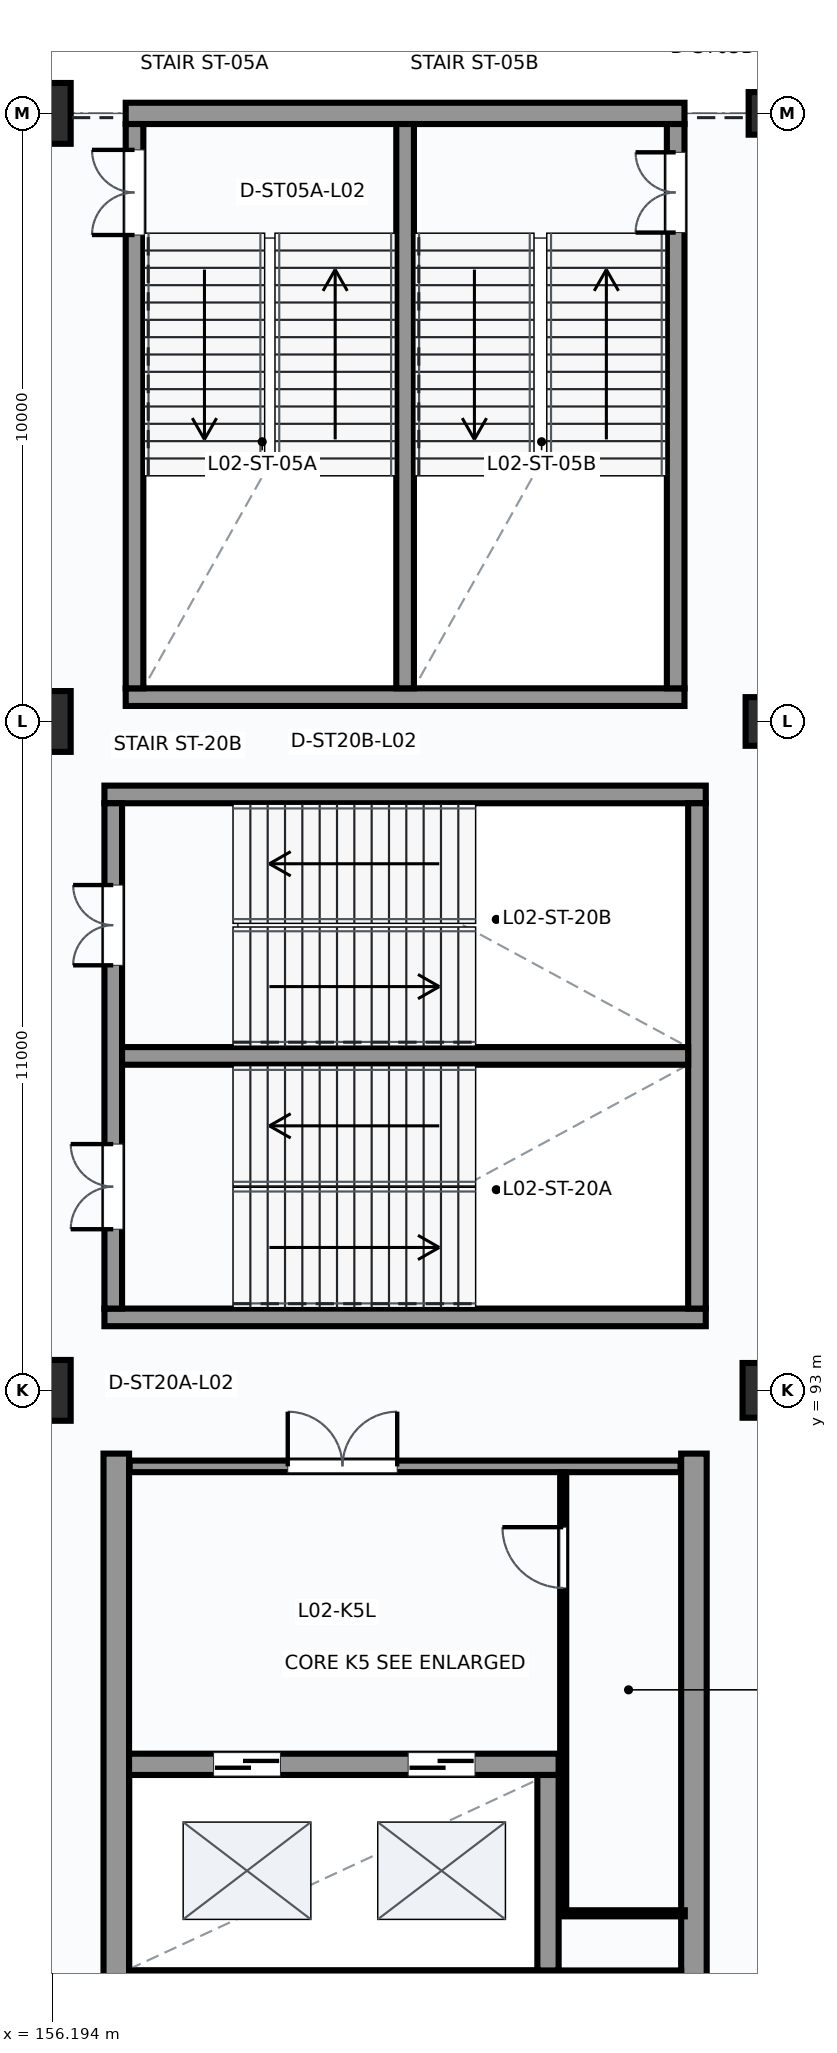
"""IFC4 building model, lengths in metres.
Left out: names, types, materials, properties, quantities, classifications, styles, units other than length and angle.
Written with IfcOpenShell. Run it as: python <this file> out.ifc"""

import sys

from ifc_helpers import new_model, si_unit, direction, frame, frame_2d, origin, origin_2d, place, context, subcontext, project, spatial, rectangle, circle, extrude, element, fill, save


model = new_model("IFC4")
c1 = context("Model", 3, precision=1e-05, world=origin(), true_north=direction((0.0, 1.0)))
c2 = subcontext(c1, "Body", "Model", "MODEL_VIEW")
j1 = project(units=[si_unit("LENGTHUNIT", "METRE"), si_unit("PLANEANGLEUNIT", "RADIAN")], contexts=[c1])
p1 = place(None, origin())
s1 = spatial("IfcSite", under=j1, at=p1, CompositionType="ELEMENT")
p2 = place(p1, origin())
s2 = spatial("IfcBuilding", under=s1, at=p2, CompositionType="ELEMENT")
p3 = place(p2, frame((0.0, 0.0, 10.2)))
s3 = spatial("IfcBuildingStorey", under=s2, at=p3, CompositionType="ELEMENT", Elevation=10.2)
for number, where, z_axis, x_axis in (
    (1, (156.0, 93.0, 0.0), (0.0, 0.0, 1.0), (1.0, 0.0, 0.0)),
    (2, (156.0, 104.0, 0.0), (0.0, 0.0, 1.0), (1.0, 0.0, 0.0)),
    (3, (156.0, 114.0, 0.0), (0.0, 0.0, 1.0), (1.0, 0.0, 0.0)),
):
    element("IfcColumn", number, at=place(p3, frame(where, z_axis=z_axis, x_axis=x_axis)), inside=s3, PredefinedType="COLUMN", context=c2, shape_type="SweptSolid", body=[
        extrude(rectangle(XDim=1.0, YDim=1.0, at=origin_2d()), origin(), (0.0, 0.0, 1.0), 4.5),
    ])
p4 = place(p3, frame((168.0, 93.0, 0.0), z_axis=(0.0, 0.0, 1.0), x_axis=(1.0, 0.0, 0.0)))
e4 = element("IfcColumn", 4, at=p4, inside=s3, PredefinedType="COLUMN", context=c2, shape_type="SweptSolid", body=[
    extrude(circle(Radius=0.45, at=origin_2d()), origin(), (0.0, 0.0, 1.0), 4.5),
])
p5 = place(p3, frame((168.0, 104.0, 0.0), z_axis=(0.0, 0.0, 1.0), x_axis=(1.0, 0.0, 0.0)))
e5 = element("IfcColumn", 5, at=p5, inside=s3, PredefinedType="COLUMN", context=c2, shape_type="SweptSolid", body=[
    extrude(circle(Radius=0.4, at=origin_2d()), origin(), (0.0, 0.0, 1.0), 4.5),
])
p6 = place(p3, frame((168.0, 114.0, 0.0), z_axis=(0.0, 0.0, 1.0), x_axis=(1.0, 0.0, 0.0)))
e6 = element("IfcColumn", 6, at=p6, inside=s3, PredefinedType="COLUMN", context=c2, shape_type="SweptSolid", body=[
    extrude(circle(Radius=0.35, at=origin_2d()), origin(), (0.0, 0.0, 1.0), 4.5),
])
p7 = place(p3, frame((157.405, 104.4, 0.0), z_axis=(0.0, 0.0, 1.0), x_axis=(1.0, 0.0, 0.0)))
e7 = element("IfcWall", 7, at=p7, inside=s3, PredefinedType="SHEAR", context=c2, shape_type="SweptSolid", body=[
    extrude(rectangle(XDim=9.19, YDim=0.29, at=frame_2d((4.595, 0.0))), origin(), (0.0, 0.0, 1.0), 4.5),
])
p8 = place(p3, frame((157.405, 114.0, 0.0), z_axis=(0.0, 0.0, 1.0), x_axis=(1.0, 0.0, 0.0)))
e8 = element("IfcWall", 8, at=p8, inside=s3, PredefinedType="SHEAR", context=c2, shape_type="SweptSolid", body=[
    extrude(rectangle(XDim=9.19, YDim=0.35, at=frame_2d((4.595, 0.0))), origin(), (0.0, 0.0, 1.0), 3.437),
])
p9 = place(p3, frame((157.55, 104.545, 0.0), z_axis=(0.0, 0.0, 1.0), x_axis=(0.0, 1.0, 0.0)))
e9 = element("IfcWall", 9, at=p9, inside=s3, PredefinedType="SHEAR", context=c2, shape_type="SweptSolid", body=[
    extrude(rectangle(XDim=9.28, YDim=0.29, at=frame_2d((4.64, 0.0))), origin(), (0.0, 0.0, 1.0), 4.5),
])
p10 = place(p9, frame((7.455, 0.0, 0.0)))
e10 = element("IfcOpeningElement", 10, at=p10, cuts=e9, PredefinedType="OPENING", context=c2, shape_type="SweptSolid", body=[
    extrude(rectangle(XDim=1.4, YDim=2.2, at=frame_2d((0.7, 1.1))), frame((0.0, 0.155, 0.0), z_axis=(0.0, -1.0, 0.0), x_axis=(1.0, 0.0, 0.0)), (0.0, 0.0, 1.0), 0.31),
])
p11 = place(p3, frame((166.45, 104.545, 0.0), z_axis=(0.0, 0.0, 1.0), x_axis=(0.0, 1.0, 0.0)))
e11 = element("IfcWall", 11, at=p11, inside=s3, PredefinedType="SHEAR", context=c2, shape_type="SweptSolid", body=[
    extrude(rectangle(XDim=9.28, YDim=0.29, at=frame_2d((4.64, 0.0))), origin(), (0.0, 0.0, 1.0), 4.5),
])
p12 = place(p11, frame((7.495, 0.0, 0.0)))
e12 = element("IfcOpeningElement", 12, at=p12, cuts=e11, PredefinedType="OPENING", context=c2, shape_type="SweptSolid", body=[
    extrude(rectangle(XDim=1.32, YDim=2.2, at=frame_2d((0.66, 1.1))), frame((0.0, 0.155, 0.0), z_axis=(0.0, -1.0, 0.0), x_axis=(1.0, 0.0, 0.0)), (0.0, 0.0, 1.0), 0.31),
])
p13 = place(p3, frame((162.0, 104.545, 0.0), z_axis=(0.0, 0.0, 1.0), x_axis=(0.0, 1.0, 0.0)))
e13 = element("IfcWall", 13, at=p13, inside=s3, PredefinedType="SHEAR", context=c2, shape_type="SweptSolid", body=[
    extrude(rectangle(XDim=9.28, YDim=0.29, at=frame_2d((4.64, 0.0))), origin(), (0.0, 0.0, 1.0), 4.5),
])
for number, where, z_axis, x_axis in (
    (14, (157.055, 94.2, 0.0), (0.0, 0.0, 1.0), (1.0, 0.0, 0.0)),
    (15, (157.055, 102.8, 0.0), (0.0, 0.0, 1.0), (1.0, 0.0, 0.0)),
):
    element("IfcWall", number, at=place(p3, frame(where, z_axis=z_axis, x_axis=x_axis)), inside=s3, PredefinedType="SHEAR", context=c2, shape_type="SweptSolid", body=[
        extrude(rectangle(XDim=9.89, YDim=0.29, at=frame_2d((4.945, 0.0))), origin(), (0.0, 0.0, 1.0), 4.5),
    ])
p14 = place(p3, frame((157.2, 94.345, 0.0), z_axis=(0.0, 0.0, 1.0), x_axis=(0.0, 1.0, 0.0)))
e16 = element("IfcWall", 16, at=p14, inside=s3, PredefinedType="SHEAR", context=c2, shape_type="SweptSolid", body=[
    extrude(rectangle(XDim=8.31, YDim=0.29, at=frame_2d((4.155, 0.0))), origin(), (0.0, 0.0, 1.0), 4.5),
])
p15 = place(p14, frame((1.305, 0.0, 0.0)))
e17 = element("IfcOpeningElement", 17, at=p15, cuts=e16, PredefinedType="OPENING", context=c2, shape_type="SweptSolid", body=[
    extrude(rectangle(XDim=1.4, YDim=2.2, at=frame_2d((0.7, 1.1))), frame((0.0, 0.155, 0.0), z_axis=(0.0, -1.0, 0.0), x_axis=(1.0, 0.0, 0.0)), (0.0, 0.0, 1.0), 0.31),
])
p16 = place(p14, frame((5.645, 0.0, 0.0)))
e18 = element("IfcOpeningElement", 18, at=p16, cuts=e16, PredefinedType="OPENING", context=c2, shape_type="SweptSolid", body=[
    extrude(rectangle(XDim=1.32, YDim=2.2, at=frame_2d((0.66, 1.1))), frame((0.0, 0.155, 0.0), z_axis=(0.0, -1.0, 0.0), x_axis=(1.0, 0.0, 0.0)), (0.0, 0.0, 1.0), 0.31),
])
p17 = place(p3, frame((166.8, 94.345, 0.0), z_axis=(0.0, 0.0, 1.0), x_axis=(0.0, 1.0, 0.0)))
e19 = element("IfcWall", 19, at=p17, inside=s3, PredefinedType="SHEAR", context=c2, shape_type="SweptSolid", body=[
    extrude(rectangle(XDim=8.31, YDim=0.29, at=frame_2d((4.155, 0.0))), origin(), (0.0, 0.0, 1.0), 4.5),
])
p18 = place(p3, frame((157.345, 98.5, 0.0), z_axis=(0.0, 0.0, 1.0), x_axis=(1.0, 0.0, 0.0)))
e20 = element("IfcWall", 20, at=p18, inside=s3, PredefinedType="SHEAR", context=c2, shape_type="SweptSolid", body=[
    extrude(rectangle(XDim=9.31, YDim=0.29, at=frame_2d((4.655, 0.0))), origin(), (0.0, 0.0, 1.0), 4.5),
])
for number, where, z_axis, x_axis in (
    (21, (157.25, 83.04, 0.0), (0.0, 0.0, 1.0), (0.0, 1.0, 0.0)),
    (22, (166.75, 83.04, 0.0), (0.0, 0.0, 1.0), (0.0, 1.0, 0.0)),
):
    element("IfcWall", number, at=place(p3, frame(where, z_axis=z_axis, x_axis=x_axis)), inside=s3, PredefinedType="SHEAR", context=c2, shape_type="SweptSolid", body=[
        extrude(rectangle(XDim=8.92, YDim=0.42, at=frame_2d((4.46, 0.0))), origin(), (0.0, 0.0, 1.0), 4.5),
    ])
p19 = place(p3, frame((157.46, 83.25, 0.0), z_axis=(0.0, 0.0, 1.0), x_axis=(1.0, 0.0, 0.0)))
e23 = element("IfcWall", 23, at=p19, inside=s3, PredefinedType="SHEAR", context=c2, shape_type="SweptSolid", body=[
    extrude(rectangle(XDim=9.08, YDim=0.42, at=frame_2d((4.54, 0.0))), origin(), (0.0, 0.0, 1.0), 4.5),
])
p20 = place(p3, frame((157.46, 86.85, 0.0), z_axis=(0.0, 0.0, 1.0), x_axis=(1.0, 0.0, 0.0)))
e24 = element("IfcWall", 24, at=p20, inside=s3, PredefinedType="SHEAR", context=c2, shape_type="SweptSolid", body=[
    extrude(rectangle(XDim=7.065, YDim=0.35, at=frame_2d((3.532, 0.0))), origin(), (0.0, 0.0, 1.0), 4.5),
])
p21 = place(p20, frame((1.39, 0.0, 0.0)))
e25 = element("IfcOpeningElement", 25, at=p21, cuts=e24, PredefinedType="OPENING", context=c2, shape_type="SweptSolid", body=[
    extrude(rectangle(XDim=1.1, YDim=2.2, at=frame_2d((0.55, 1.1))), frame((0.0, 0.185, 0.0), z_axis=(0.0, -1.0, 0.0), x_axis=(1.0, 0.0, 0.0)), (0.0, 0.0, 1.0), 0.37),
])
p22 = place(p20, frame((4.59, 0.0, 0.0)))
e26 = element("IfcOpeningElement", 26, at=p22, cuts=e24, PredefinedType="OPENING", context=c2, shape_type="SweptSolid", body=[
    extrude(rectangle(XDim=1.1, YDim=2.2, at=frame_2d((0.55, 1.1))), frame((0.0, 0.185, 0.0), z_axis=(0.0, -1.0, 0.0), x_axis=(1.0, 0.0, 0.0)), (0.0, 0.0, 1.0), 0.37),
])
p23 = place(p3, frame((164.35, 83.46, 0.0), z_axis=(0.0, 0.0, 1.0), x_axis=(0.0, 1.0, 0.0)))
e27 = element("IfcWall", 27, at=p23, inside=s3, PredefinedType="SHEAR", context=c2, shape_type="SweptSolid", body=[
    extrude(rectangle(XDim=3.215, YDim=0.35, at=frame_2d((1.607, 0.0))), origin(), (0.0, 0.0, 1.0), 4.5),
])
p24 = place(p3, frame((157.47, 91.75, 0.0), z_axis=(0.0, 0.0, 1.0), x_axis=(1.0, 0.0, 0.0)))
e28 = element("IfcWall", 28, at=p24, inside=s3, PredefinedType="PARTITIONING", context=c2, shape_type="SweptSolid", body=[
    extrude(rectangle(XDim=9.06, YDim=0.19, at=frame_2d((4.53, 0.0))), origin(), (0.0, 0.0, 1.0), 4.15),
])
p25 = place(p24, frame((2.6, 0.0, 0.0)))
e29 = element("IfcOpeningElement", 29, at=p25, cuts=e28, PredefinedType="OPENING", context=c2, shape_type="SweptSolid", body=[
    extrude(rectangle(XDim=1.8, YDim=2.3, at=frame_2d((0.9, 1.15))), frame((0.0, 0.105, 0.0), z_axis=(0.0, -1.0, 0.0), x_axis=(1.0, 0.0, 0.0)), (0.0, 0.0, 1.0), 0.21),
])
p26 = place(p3, frame((164.6, 84.4, 0.0), z_axis=(0.0, 0.0, 1.0), x_axis=(0.0, 1.0, 0.0)))
e30 = element("IfcWall", 30, at=p26, inside=s3, PredefinedType="PARTITIONING", context=c2, shape_type="SweptSolid", body=[
    extrude(rectangle(XDim=7.25, YDim=0.1, at=frame_2d((3.625, 0.0))), origin(), (0.0, 0.0, 1.0), 4.15),
])
p27 = place(p26, frame((5.35, 0.0, 0.0)))
e31 = element("IfcOpeningElement", 31, at=p27, cuts=e30, PredefinedType="OPENING", context=c2, shape_type="SweptSolid", body=[
    extrude(rectangle(XDim=1.0, YDim=2.1, at=frame_2d((0.5, 1.05))), frame((0.0, 0.06, 0.0), z_axis=(0.0, -1.0, 0.0), x_axis=(1.0, 0.0, 0.0)), (0.0, 0.0, 1.0), 0.12),
])
p28 = place(p3, frame((164.6, 84.4, 0.0), z_axis=(0.0, 0.0, 1.0), x_axis=(1.0, 0.0, 0.0)))
e32 = element("IfcWall", 32, at=p28, inside=s3, PredefinedType="PARTITIONING", context=c2, shape_type="SweptSolid", body=[
    extrude(rectangle(XDim=2.0, YDim=0.1, at=frame_2d((1.0, 0.0))), origin(), (0.0, 0.0, 1.0), 4.15),
])
p29 = place(p10, frame((1.4, 0.0, 0.0), z_axis=(0.0, 0.0, 1.0), x_axis=(-1.0, 0.0, 0.0)))
e33 = element("IfcDoor", 33, at=p29, inside=s3, OperationType="DOUBLE_DOOR_SINGLE_SWING", PredefinedType="DOOR", context=c2, shape_type="SweptSolid", body=[
    extrude(rectangle(XDim=1.4, YDim=2.2, at=frame_2d((0.7, 1.1))), frame((0.0, 0.025, 0.0), z_axis=(0.0, -1.0, 0.0), x_axis=(1.0, 0.0, 0.0)), (0.0, 0.0, 1.0), 0.05),
])
fill(e10, e33)
p30 = place(p12, origin())
e34 = element("IfcDoor", 34, at=p30, inside=s3, OperationType="DOUBLE_DOOR_SINGLE_SWING", PredefinedType="DOOR", context=c2, shape_type="SweptSolid", body=[
    extrude(rectangle(XDim=1.32, YDim=2.2, at=frame_2d((0.66, 1.1))), frame((0.0, 0.025, 0.0), z_axis=(0.0, -1.0, 0.0), x_axis=(1.0, 0.0, 0.0)), (0.0, 0.0, 1.0), 0.05),
])
fill(e12, e34)
p31 = place(p15, origin())
e35 = element("IfcDoor", 35, at=p31, inside=s3, OperationType="DOUBLE_DOOR_SINGLE_SWING", PredefinedType="DOOR", context=c2, shape_type="SweptSolid", body=[
    extrude(rectangle(XDim=1.4, YDim=2.2, at=frame_2d((0.7, 1.1))), frame((0.0, 0.025, 0.0), z_axis=(0.0, -1.0, 0.0), x_axis=(1.0, 0.0, 0.0)), (0.0, 0.0, 1.0), 0.05),
])
fill(e17, e35)
p32 = place(p16, origin())
e36 = element("IfcDoor", 36, at=p32, inside=s3, OperationType="DOUBLE_DOOR_SINGLE_SWING", PredefinedType="DOOR", context=c2, shape_type="SweptSolid", body=[
    extrude(rectangle(XDim=1.32, YDim=2.2, at=frame_2d((0.66, 1.1))), frame((0.0, 0.025, 0.0), z_axis=(0.0, -1.0, 0.0), x_axis=(1.0, 0.0, 0.0)), (0.0, 0.0, 1.0), 0.05),
])
fill(e18, e36)
p33 = place(p21, origin())
e37 = element("IfcDoor", 37, at=p33, inside=s3, OperationType="SLIDING_TO_LEFT", PredefinedType="DOOR", context=c2, shape_type="SweptSolid", body=[
    extrude(rectangle(XDim=1.1, YDim=2.2, at=frame_2d((0.55, 1.1))), frame((0.0, 0.025, 0.0), z_axis=(0.0, -1.0, 0.0), x_axis=(1.0, 0.0, 0.0)), (0.0, 0.0, 1.0), 0.05),
])
fill(e25, e37)
p34 = place(p22, origin())
e38 = element("IfcDoor", 38, at=p34, inside=s3, OperationType="SLIDING_TO_LEFT", PredefinedType="DOOR", context=c2, shape_type="SweptSolid", body=[
    extrude(rectangle(XDim=1.1, YDim=2.2, at=frame_2d((0.55, 1.1))), frame((0.0, 0.025, 0.0), z_axis=(0.0, -1.0, 0.0), x_axis=(1.0, 0.0, 0.0)), (0.0, 0.0, 1.0), 0.05),
])
fill(e26, e38)
p35 = place(p25, origin())
e39 = element("IfcDoor", 39, at=p35, inside=s3, OperationType="DOUBLE_DOOR_SINGLE_SWING", PredefinedType="DOOR", context=c2, shape_type="SweptSolid", body=[
    extrude(rectangle(XDim=1.8, YDim=2.3, at=frame_2d((0.9, 1.15))), frame((0.0, 0.025, 0.0), z_axis=(0.0, -1.0, 0.0), x_axis=(1.0, 0.0, 0.0)), (0.0, 0.0, 1.0), 0.05),
])
fill(e29, e39)
p36 = place(p27, origin())
e40 = element("IfcDoor", 40, at=p36, inside=s3, OperationType="SINGLE_SWING_RIGHT", PredefinedType="DOOR", context=c2, shape_type="SweptSolid", body=[
    extrude(rectangle(XDim=1.0, YDim=2.1, at=frame_2d((0.5, 1.05))), frame((0.0, 0.025, 0.0), z_axis=(0.0, -1.0, 0.0), x_axis=(1.0, 0.0, 0.0)), (0.0, 0.0, 1.0), 0.05),
])
fill(e31, e40)
save(model, sys.argv[1])
